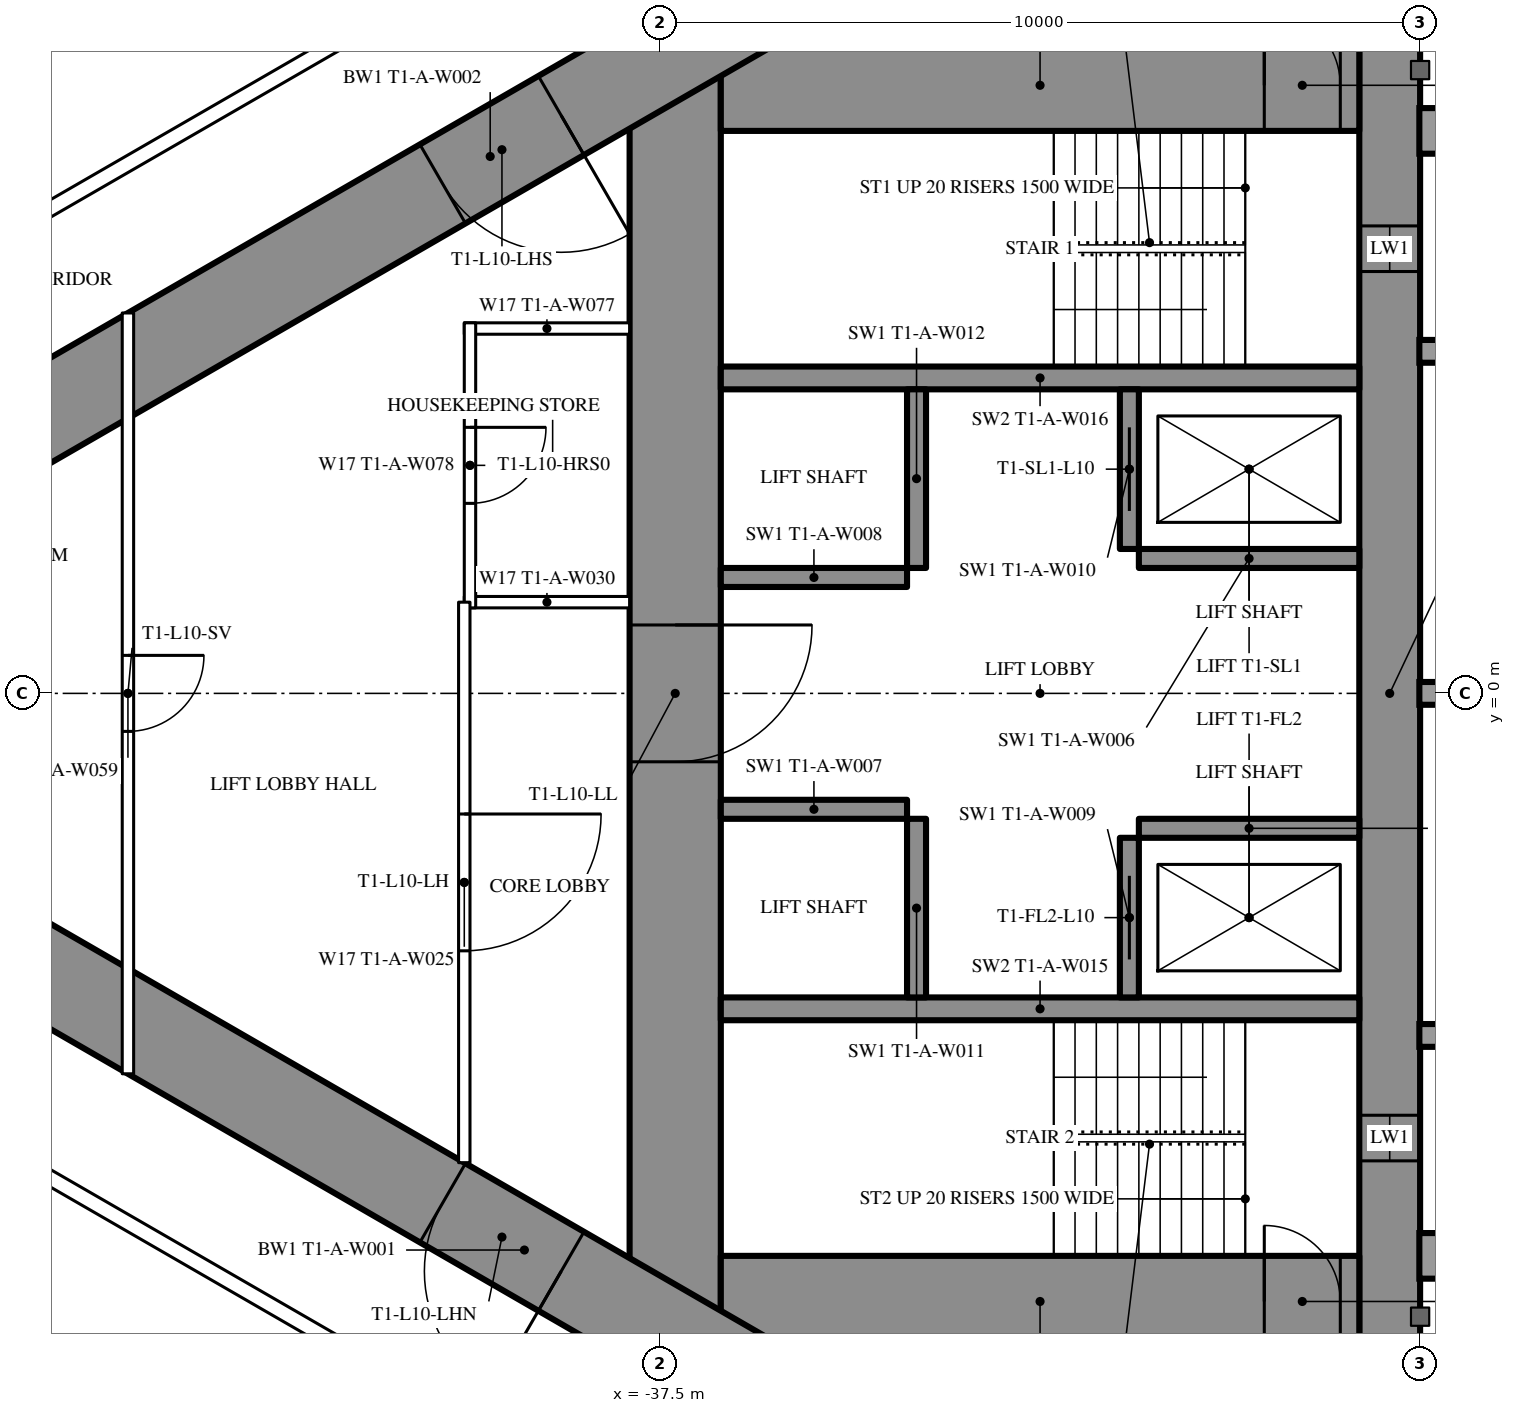
"""IFC4 building model, lengths in metres.
Left out: names, types, materials, properties, quantities, classifications, styles, units other than length and angle.
Written with IfcOpenShell. Run it as: python <this file> out.ifc"""

import sys

from ifc_helpers import new_model, si_unit, direction, frame, frame_2d, origin, place, context, subcontext, project, spatial, rectangle, extrude, element, fill, save


model = new_model("IFC4")
c1 = context("Model", 3, precision=1e-05, world=origin(), true_north=direction((0.0, 1.0)))
c2 = subcontext(c1, "Body", "Model", "MODEL_VIEW")
j1 = project(units=[si_unit("LENGTHUNIT", "METRE"), si_unit("PLANEANGLEUNIT", "RADIAN")], contexts=[c1])
p1 = place(None, origin())
s1 = spatial("IfcSite", under=j1, at=p1, CompositionType="ELEMENT")
p2 = place(p1, origin())
s2 = spatial("IfcBuilding", under=s1, at=p2, CompositionType="ELEMENT")
p3 = place(p2, frame((0.0, 0.0, 42.5)))
s3 = spatial("IfcBuildingStorey", under=s2, at=p3, CompositionType="ELEMENT", Elevation=42.5)
p4 = place(p3, frame((-27.9, 8.6, 0.0), z_axis=(0.0, 0.0, 1.0), x_axis=(0.0, -1.0, 0.0)))
e1 = element("IfcWall", 1, at=p4, inside=s3, PredefinedType="SHEAR", context=c2, shape_type="SweptSolid", body=[
    extrude(rectangle(XDim=17.2, YDim=0.8, at=frame_2d((8.6, 0.0))), origin(), (0.0, 0.0, 1.0), 3.5),
])
p5 = place(p4, frame((2.45, 0.0, 0.6)))
e2 = element("IfcOpeningElement", 2, at=p5, cuts=e1, PredefinedType="OPENING", context=c2, shape_type="SweptSolid", body=[
    extrude(rectangle(XDim=0.6, YDim=2.1, at=frame_2d((0.3, 1.05))), frame((0.0, 0.41, 0.0), z_axis=(0.0, -1.0, 0.0), x_axis=(1.0, 0.0, 0.0)), (0.0, 0.0, 1.0), 0.82),
])
p6 = place(p4, frame((14.15, 0.0, 0.6)))
e3 = element("IfcOpeningElement", 3, at=p6, cuts=e1, PredefinedType="OPENING", context=c2, shape_type="SweptSolid", body=[
    extrude(rectangle(XDim=0.6, YDim=2.1, at=frame_2d((0.3, 1.05))), frame((0.0, 0.41, 0.0), z_axis=(0.0, -1.0, 0.0), x_axis=(1.0, 0.0, 0.0)), (0.0, 0.0, 1.0), 0.82),
])
p7 = place(p3, frame((-37.3, 8.6, 0.0), z_axis=(0.0, 0.0, 1.0), x_axis=(0.0, -1.0, 0.0)))
e4 = element("IfcWall", 4, at=p7, inside=s3, PredefinedType="SHEAR", context=c2, shape_type="SweptSolid", body=[
    extrude(rectangle(XDim=17.2, YDim=1.2, at=frame_2d((8.6, 0.0))), origin(), (0.0, 0.0, 1.0), 3.5),
])
p8 = place(p7, frame((7.7, 0.0, 0.0)))
e5 = element("IfcOpeningElement", 5, at=p8, cuts=e4, PredefinedType="OPENING", context=c2, shape_type="SweptSolid", body=[
    extrude(rectangle(XDim=1.8, YDim=2.2, at=frame_2d((0.9, 1.1))), frame((0.0, 0.61, 0.0), z_axis=(0.0, -1.0, 0.0), x_axis=(1.0, 0.0, 0.0)), (0.0, 0.0, 1.0), 1.22),
])
p9 = place(p3, frame((-28.3, 8.0, 0.0), z_axis=(0.0, 0.0, 1.0), x_axis=(-1.0, 0.0, 0.0)))
e6 = element("IfcWall", 6, at=p9, inside=s3, PredefinedType="SHEAR", context=c2, shape_type="SweptSolid", body=[
    extrude(rectangle(XDim=8.4, YDim=1.2, at=frame_2d((4.2, 0.0))), origin(), (0.0, 0.0, 1.0), 3.5),
])
p10 = place(p9, frame((0.25, 0.0, 0.0)))
e7 = element("IfcOpeningElement", 7, at=p10, cuts=e6, PredefinedType="OPENING", context=c2, shape_type="SweptSolid", body=[
    extrude(rectangle(XDim=1.0, YDim=2.2, at=frame_2d((0.5, 1.1))), frame((0.0, 0.61, 0.0), z_axis=(0.0, -1.0, 0.0), x_axis=(1.0, 0.0, 0.0)), (0.0, 0.0, 1.0), 1.22),
])
p11 = place(p3, frame((-28.3, -8.0, 0.0), z_axis=(0.0, 0.0, 1.0), x_axis=(-1.0, 0.0, 0.0)))
e8 = element("IfcWall", 8, at=p11, inside=s3, PredefinedType="SHEAR", context=c2, shape_type="SweptSolid", body=[
    extrude(rectangle(XDim=8.4, YDim=1.2, at=frame_2d((4.2, 0.0))), origin(), (0.0, 0.0, 1.0), 3.5),
])
p12 = place(p11, frame((0.25, 0.0, 0.0)))
e9 = element("IfcOpeningElement", 9, at=p12, cuts=e8, PredefinedType="OPENING", context=c2, shape_type="SweptSolid", body=[
    extrude(rectangle(XDim=1.0, YDim=2.2, at=frame_2d((0.5, 1.1))), frame((0.0, 0.61, 0.0), z_axis=(0.0, -1.0, 0.0), x_axis=(1.0, 0.0, 0.0)), (0.0, 0.0, 1.0), 1.22),
])
for number, where, z_axis, x_axis in (
    (10, (-28.3, 4.15, 0.0), (0.0, 0.0, 1.0), (-1.0, 0.0, 0.0)),
    (11, (-28.3, -4.15, 0.0), (0.0, 0.0, 1.0), (-1.0, 0.0, 0.0)),
):
    element("IfcWall", number, at=place(p3, frame(where, z_axis=z_axis, x_axis=x_axis)), inside=s3, PredefinedType="SHEAR", context=c2, shape_type="SweptSolid", body=[
        extrude(rectangle(XDim=8.4, YDim=0.3, at=frame_2d((4.2, 0.0))), origin(), (0.0, 0.0, 1.0), 3.5),
    ])
p13 = place(p3, frame((-31.325, 4.0, 0.0), z_axis=(0.0, 0.0, 1.0), x_axis=(0.0, -1.0, 0.0)))
e12 = element("IfcWall", 12, at=p13, inside=s3, PredefinedType="SHEAR", context=c2, shape_type="SweptSolid", body=[
    extrude(rectangle(XDim=2.1, YDim=0.25, at=frame_2d((1.05, 0.0))), origin(), (0.0, 0.0, 1.0), 3.5),
])
p14 = place(p13, frame((0.5, 0.0, 0.0)))
e13 = element("IfcOpeningElement", 13, at=p14, cuts=e12, PredefinedType="OPENING", context=c2, shape_type="SweptSolid", body=[
    extrude(rectangle(XDim=1.1, YDim=2.2, at=frame_2d((0.55, 1.1))), frame((0.0, 0.135, 0.0), z_axis=(0.0, -1.0, 0.0), x_axis=(1.0, 0.0, 0.0)), (0.0, 0.0, 1.0), 0.27),
])
p15 = place(p3, frame((-34.125, 4.0, 0.0), z_axis=(0.0, 0.0, 1.0), x_axis=(0.0, -1.0, 0.0)))
e14 = element("IfcWall", 14, at=p15, inside=s3, PredefinedType="SHEAR", context=c2, shape_type="SweptSolid", body=[
    extrude(rectangle(XDim=2.35, YDim=0.25, at=frame_2d((1.175, 0.0))), origin(), (0.0, 0.0, 1.0), 3.5),
])
p16 = place(p3, frame((-28.3, 1.775, 0.0), z_axis=(0.0, 0.0, 1.0), x_axis=(-1.0, 0.0, 0.0)))
e15 = element("IfcWall", 15, at=p16, inside=s3, PredefinedType="SHEAR", context=c2, shape_type="SweptSolid", body=[
    extrude(rectangle(XDim=2.9, YDim=0.25, at=frame_2d((1.45, 0.0))), origin(), (0.0, 0.0, 1.0), 3.5),
])
p17 = place(p3, frame((-34.25, 1.525, 0.0), z_axis=(0.0, 0.0, 1.0), x_axis=(-1.0, 0.0, 0.0)))
e16 = element("IfcWall", 16, at=p17, inside=s3, PredefinedType="SHEAR", context=c2, shape_type="SweptSolid", body=[
    extrude(rectangle(XDim=2.45, YDim=0.25, at=frame_2d((1.225, 0.0))), origin(), (0.0, 0.0, 1.0), 3.5),
])
p18 = place(p3, frame((-31.325, -1.9, 0.0), z_axis=(0.0, 0.0, 1.0), x_axis=(0.0, -1.0, 0.0)))
e17 = element("IfcWall", 17, at=p18, inside=s3, PredefinedType="SHEAR", context=c2, shape_type="SweptSolid", body=[
    extrude(rectangle(XDim=2.1, YDim=0.25, at=frame_2d((1.05, 0.0))), origin(), (0.0, 0.0, 1.0), 3.5),
])
p19 = place(p18, frame((0.5, 0.0, 0.0)))
e18 = element("IfcOpeningElement", 18, at=p19, cuts=e17, PredefinedType="OPENING", context=c2, shape_type="SweptSolid", body=[
    extrude(rectangle(XDim=1.1, YDim=2.2, at=frame_2d((0.55, 1.1))), frame((0.0, 0.135, 0.0), z_axis=(0.0, -1.0, 0.0), x_axis=(1.0, 0.0, 0.0)), (0.0, 0.0, 1.0), 0.27),
])
p20 = place(p3, frame((-34.125, -1.65, 0.0), z_axis=(0.0, 0.0, 1.0), x_axis=(0.0, -1.0, 0.0)))
e19 = element("IfcWall", 19, at=p20, inside=s3, PredefinedType="SHEAR", context=c2, shape_type="SweptSolid", body=[
    extrude(rectangle(XDim=2.35, YDim=0.25, at=frame_2d((1.175, 0.0))), origin(), (0.0, 0.0, 1.0), 3.5),
])
p21 = place(p3, frame((-28.3, -1.775, 0.0), z_axis=(0.0, 0.0, 1.0), x_axis=(-1.0, 0.0, 0.0)))
e20 = element("IfcWall", 20, at=p21, inside=s3, PredefinedType="SHEAR", context=c2, shape_type="SweptSolid", body=[
    extrude(rectangle(XDim=2.9, YDim=0.25, at=frame_2d((1.45, 0.0))), origin(), (0.0, 0.0, 1.0), 3.5),
])
p22 = place(p3, frame((-34.25, -1.525, 0.0), z_axis=(0.0, 0.0, 1.0), x_axis=(-1.0, 0.0, 0.0)))
e21 = element("IfcWall", 21, at=p22, inside=s3, PredefinedType="SHEAR", context=c2, shape_type="SweptSolid", body=[
    extrude(rectangle(XDim=2.45, YDim=0.25, at=frame_2d((1.225, 0.0))), origin(), (0.0, 0.0, 1.0), 3.5),
])
p23 = place(p3, frame((-27.2, 14.3, 0.0), z_axis=(0.0, 0.0, 1.0), x_axis=(-0.866026593062, -0.499997940104, 0.0)))
e22 = element("IfcWall", 22, at=p23, inside=s3, PredefinedType="SHEAR", context=c2, shape_type="SweptSolid", body=[
    extrude(rectangle(XDim=28.946, YDim=1.2, at=frame_2d((14.473, 0.0))), origin(), (0.0, 0.0, 1.0), 3.5),
])
p24 = place(p23, frame((4.6, 0.0, 0.0)))
e23 = element("IfcOpeningElement", 23, at=p24, cuts=e22, PredefinedType="OPENING", context=c2, shape_type="SweptSolid", body=[
    extrude(rectangle(XDim=1.0, YDim=2.2, at=frame_2d((0.5, 1.1))), frame((0.0, 0.61, 0.0), z_axis=(0.0, -1.0, 0.0), x_axis=(1.0, 0.0, 0.0)), (0.0, 0.0, 1.0), 1.22),
])
p25 = place(p23, frame((13.395, 0.0, 0.0)))
e24 = element("IfcOpeningElement", 24, at=p25, cuts=e22, PredefinedType="OPENING", context=c2, shape_type="SweptSolid", body=[
    extrude(rectangle(XDim=1.8, YDim=2.2, at=frame_2d((0.9, 1.1))), frame((0.0, 0.61, 0.0), z_axis=(0.0, -1.0, 0.0), x_axis=(1.0, 0.0, 0.0)), (0.0, 0.0, 1.0), 1.22),
])
p26 = place(p3, frame((-27.2, -14.3, 0.0), z_axis=(0.0, 0.0, 1.0), x_axis=(-0.866024021859, 0.500002393557, 0.0)))
e25 = element("IfcWall", 25, at=p26, inside=s3, PredefinedType="SHEAR", context=c2, shape_type="SweptSolid", body=[
    extrude(rectangle(XDim=27.907, YDim=1.2, at=frame_2d((13.954, 0.0))), origin(), (0.0, 0.0, 1.0), 3.5),
])
p27 = place(p26, frame((4.6, 0.0, 0.0)))
e26 = element("IfcOpeningElement", 26, at=p27, cuts=e25, PredefinedType="OPENING", context=c2, shape_type="SweptSolid", body=[
    extrude(rectangle(XDim=1.0, YDim=2.2, at=frame_2d((0.5, 1.1))), frame((0.0, 0.61, 0.0), z_axis=(0.0, -1.0, 0.0), x_axis=(1.0, 0.0, 0.0)), (0.0, 0.0, 1.0), 1.22),
])
p28 = place(p26, frame((13.395, 0.0, 0.0)))
e27 = element("IfcOpeningElement", 27, at=p28, cuts=e25, PredefinedType="OPENING", context=c2, shape_type="SweptSolid", body=[
    extrude(rectangle(XDim=1.8, YDim=2.2, at=frame_2d((0.9, 1.1))), frame((0.0, 0.61, 0.0), z_axis=(0.0, -1.0, 0.0), x_axis=(1.0, 0.0, 0.0)), (0.0, 0.0, 1.0), 1.22),
])
p29 = place(p3, frame((-37.7, 10.894, 0.0), z_axis=(0.0, 0.0, 1.0), x_axis=(-0.866027905338, -0.499995667157, 0.0)))
e28 = element("IfcWall", 28, at=p29, inside=s3, PredefinedType="PARTITIONING", context=c2, shape_type="SweptSolid", body=[
    extrude(rectangle(XDim=21.787, YDim=0.2, at=frame_2d((10.894, 0.0))), origin(), (0.0, 0.0, 1.0), 3.25),
])
p30 = place(p29, frame((11.78, 0.0, 0.0)))
e29 = element("IfcOpeningElement", 29, at=p30, cuts=e28, PredefinedType="OPENING", context=c2, shape_type="SweptSolid", body=[
    extrude(rectangle(XDim=0.95, YDim=2.2, at=frame_2d((0.475, 1.1))), frame((0.0, 0.11, 0.0), z_axis=(0.0, -1.0, 0.0), x_axis=(1.0, 0.0, 0.0)), (0.0, 0.0, 1.0), 0.22),
])
p31 = place(p29, frame((2.95, 0.0, 0.0)))
e30 = element("IfcOpeningElement", 30, at=p31, cuts=e28, PredefinedType="OPENING", context=c2, shape_type="SweptSolid", body=[
    extrude(rectangle(XDim=0.95, YDim=2.2, at=frame_2d((0.475, 1.1))), frame((0.0, 0.11, 0.0), z_axis=(0.0, -1.0, 0.0), x_axis=(1.0, 0.0, 0.0)), (0.0, 0.0, 1.0), 0.22),
])
p32 = place(p3, frame((-36.92, -11.344, 0.0), z_axis=(0.0, 0.0, 1.0), x_axis=(-0.866028313256, 0.499994960614, 0.0)))
e31 = element("IfcWall", 31, at=p32, inside=s3, PredefinedType="PARTITIONING", context=c2, shape_type="SweptSolid", body=[
    extrude(rectangle(XDim=22.568, YDim=0.2, at=frame_2d((11.284, 0.0))), origin(), (0.0, 0.0, 1.0), 3.25),
])
p33 = place(p32, frame((21.018, 0.0, 0.0)))
e32 = element("IfcOpeningElement", 32, at=p33, cuts=e31, PredefinedType="OPENING", context=c2, shape_type="SweptSolid", body=[
    extrude(rectangle(XDim=0.95, YDim=2.2, at=frame_2d((0.475, 1.1))), frame((0.0, 0.11, 0.0), z_axis=(0.0, -1.0, 0.0), x_axis=(1.0, 0.0, 0.0)), (0.0, 0.0, 1.0), 0.22),
])
p34 = place(p32, frame((3.35, 0.0, 0.0)))
e33 = element("IfcOpeningElement", 33, at=p34, cuts=e31, PredefinedType="OPENING", context=c2, shape_type="SweptSolid", body=[
    extrude(rectangle(XDim=1.0, YDim=2.2, at=frame_2d((0.5, 1.1))), frame((0.0, 0.11, 0.0), z_axis=(0.0, -1.0, 0.0), x_axis=(1.0, 0.0, 0.0)), (0.0, 0.0, 1.0), 0.22),
])
for number, where, z_axis, x_axis in (
    (34, (-37.9, 1.2, 0.0), (0.0, 0.0, 1.0), (-1.0, 0.0, 0.0)),
    (35, (-37.9, 4.8, 0.0), (0.0, 0.0, 1.0), (-1.0, 0.0, 0.0)),
):
    element("IfcWall", number, at=place(p3, frame(where, z_axis=z_axis, x_axis=x_axis)), inside=s3, PredefinedType="PARTITIONING", context=c2, shape_type="SweptSolid", body=[
        extrude(rectangle(XDim=2.175, YDim=0.15, at=frame_2d((1.087, 0.0))), origin(), (0.0, 0.0, 1.0), 3.25),
    ])
p35 = place(p3, frame((-40.0, 4.875, 0.0), z_axis=(0.0, 0.0, 1.0), x_axis=(0.0, -1.0, 0.0)))
e36 = element("IfcWall", 36, at=p35, inside=s3, PredefinedType="PARTITIONING", context=c2, shape_type="SweptSolid", body=[
    extrude(rectangle(XDim=3.75, YDim=0.15, at=frame_2d((1.875, 0.0))), origin(), (0.0, 0.0, 1.0), 3.25),
])
p36 = place(p35, frame((1.375, 0.0, 0.0)))
e37 = element("IfcOpeningElement", 37, at=p36, cuts=e36, PredefinedType="OPENING", context=c2, shape_type="SweptSolid", body=[
    extrude(rectangle(XDim=1.0, YDim=2.2, at=frame_2d((0.5, 1.1))), frame((0.0, 0.085, 0.0), z_axis=(0.0, -1.0, 0.0), x_axis=(1.0, 0.0, 0.0)), (0.0, 0.0, 1.0), 0.17),
])
p37 = place(p3, frame((-40.075, 1.2, 0.0), z_axis=(0.0, 0.0, 1.0), x_axis=(0.0, -1.0, 0.0)))
e38 = element("IfcWall", 38, at=p37, inside=s3, PredefinedType="PARTITIONING", context=c2, shape_type="SweptSolid", body=[
    extrude(rectangle(XDim=7.374, YDim=0.15, at=frame_2d((3.687, 0.0))), origin(), (0.0, 0.0, 1.0), 3.25),
])
p38 = place(p37, frame((2.787, 0.0, 0.0)))
e39 = element("IfcOpeningElement", 39, at=p38, cuts=e38, PredefinedType="OPENING", context=c2, shape_type="SweptSolid", body=[
    extrude(rectangle(XDim=1.8, YDim=2.2, at=frame_2d((0.9, 1.1))), frame((0.0, 0.085, 0.0), z_axis=(0.0, -1.0, 0.0), x_axis=(1.0, 0.0, 0.0)), (0.0, 0.0, 1.0), 0.17),
])
p39 = place(p3, frame((-44.5, 5.005, 0.0), z_axis=(0.0, 0.0, 1.0), x_axis=(0.0, -1.0, 0.0)))
e40 = element("IfcWall", 40, at=p39, inside=s3, PredefinedType="PARTITIONING", context=c2, shape_type="SweptSolid", body=[
    extrude(rectangle(XDim=10.009, YDim=0.15, at=frame_2d((5.005, 0.0))), origin(), (0.0, 0.0, 1.0), 2.45),
])
p40 = place(p39, frame((4.505, 0.0, 0.0)))
e41 = element("IfcOpeningElement", 41, at=p40, cuts=e40, PredefinedType="OPENING", context=c2, shape_type="SweptSolid", body=[
    extrude(rectangle(XDim=1.0, YDim=2.2, at=frame_2d((0.5, 1.1))), frame((0.0, 0.085, 0.0), z_axis=(0.0, -1.0, 0.0), x_axis=(1.0, 0.0, 0.0)), (0.0, 0.0, 1.0), 0.17),
])
p41 = place(p36, origin())
e42 = element("IfcDoor", 42, at=p41, inside=s3, OperationType="SINGLE_SWING_LEFT", PredefinedType="DOOR", context=c2, shape_type="SweptSolid", body=[
    extrude(rectangle(XDim=1.0, YDim=2.2, at=frame_2d((0.5, 1.1))), frame((0.0, 0.025, 0.0), z_axis=(0.0, -1.0, 0.0), x_axis=(1.0, 0.0, 0.0)), (0.0, 0.0, 1.0), 0.05),
])
fill(e37, e42)
p42 = place(p38, origin())
e43 = element("IfcDoor", 43, at=p42, inside=s3, OperationType="DOUBLE_DOOR_SINGLE_SWING", PredefinedType="DOOR", context=c2, shape_type="SweptSolid", body=[
    extrude(rectangle(XDim=1.8, YDim=2.2, at=frame_2d((0.9, 1.1))), frame((0.0, 0.025, 0.0), z_axis=(0.0, -1.0, 0.0), x_axis=(1.0, 0.0, 0.0)), (0.0, 0.0, 1.0), 0.05),
])
fill(e39, e43)
p43 = place(p40, origin())
e44 = element("IfcDoor", 44, at=p43, inside=s3, OperationType="SINGLE_SWING_LEFT", PredefinedType="DOOR", context=c2, shape_type="SweptSolid", body=[
    extrude(rectangle(XDim=1.0, YDim=2.2, at=frame_2d((0.5, 1.1))), frame((0.0, 0.025, 0.0), z_axis=(0.0, -1.0, 0.0), x_axis=(1.0, 0.0, 0.0)), (0.0, 0.0, 1.0), 0.05),
])
fill(e41, e44)
p44 = place(p25, origin())
e45 = element("IfcDoor", 45, at=p44, inside=s3, OperationType="DOUBLE_DOOR_SINGLE_SWING", PredefinedType="DOOR", context=c2, shape_type="SweptSolid", body=[
    extrude(rectangle(XDim=1.8, YDim=2.2, at=frame_2d((0.9, 1.1))), frame((0.0, 0.025, 0.0), z_axis=(0.0, -1.0, 0.0), x_axis=(1.0, 0.0, 0.0)), (0.0, 0.0, 1.0), 0.05),
])
fill(e24, e45)
p45 = place(p28, origin())
e46 = element("IfcDoor", 46, at=p45, inside=s3, OperationType="DOUBLE_DOOR_SINGLE_SWING", PredefinedType="DOOR", context=c2, shape_type="SweptSolid", body=[
    extrude(rectangle(XDim=1.8, YDim=2.2, at=frame_2d((0.9, 1.1))), frame((0.0, 0.025, 0.0), z_axis=(0.0, -1.0, 0.0), x_axis=(1.0, 0.0, 0.0)), (0.0, 0.0, 1.0), 0.05),
])
fill(e27, e46)
p46 = place(p8, origin())
e47 = element("IfcDoor", 47, at=p46, inside=s3, OperationType="DOUBLE_DOOR_SINGLE_SWING", PredefinedType="DOOR", context=c2, shape_type="SweptSolid", body=[
    extrude(rectangle(XDim=1.8, YDim=2.2, at=frame_2d((0.9, 1.1))), frame((0.0, 0.025, 0.0), z_axis=(0.0, -1.0, 0.0), x_axis=(1.0, 0.0, 0.0)), (0.0, 0.0, 1.0), 0.05),
])
fill(e5, e47)
p47 = place(p10, origin())
e48 = element("IfcDoor", 48, at=p47, inside=s3, OperationType="SINGLE_SWING_RIGHT", PredefinedType="DOOR", context=c2, shape_type="SweptSolid", body=[
    extrude(rectangle(XDim=1.0, YDim=2.2, at=frame_2d((0.5, 1.1))), frame((0.0, 0.025, 0.0), z_axis=(0.0, -1.0, 0.0), x_axis=(1.0, 0.0, 0.0)), (0.0, 0.0, 1.0), 0.05),
])
fill(e7, e48)
p48 = place(p12, origin())
e49 = element("IfcDoor", 49, at=p48, inside=s3, OperationType="SINGLE_SWING_RIGHT", PredefinedType="DOOR", context=c2, shape_type="SweptSolid", body=[
    extrude(rectangle(XDim=1.0, YDim=2.2, at=frame_2d((0.5, 1.1))), frame((0.0, 0.025, 0.0), z_axis=(0.0, -1.0, 0.0), x_axis=(1.0, 0.0, 0.0)), (0.0, 0.0, 1.0), 0.05),
])
fill(e9, e49)
p49 = place(p14, origin())
e50 = element("IfcDoor", 50, at=p49, inside=s3, OperationType="SLIDING_TO_LEFT", PredefinedType="USERDEFINED", context=c2, shape_type="SweptSolid", body=[
    extrude(rectangle(XDim=1.1, YDim=2.2, at=frame_2d((0.55, 1.1))), frame((0.0, 0.025, 0.0), z_axis=(0.0, -1.0, 0.0), x_axis=(1.0, 0.0, 0.0)), (0.0, 0.0, 1.0), 0.05),
])
fill(e13, e50)
p50 = place(p19, origin())
e51 = element("IfcDoor", 51, at=p50, inside=s3, OperationType="SLIDING_TO_LEFT", PredefinedType="USERDEFINED", context=c2, shape_type="SweptSolid", body=[
    extrude(rectangle(XDim=1.1, YDim=2.2, at=frame_2d((0.55, 1.1))), frame((0.0, 0.025, 0.0), z_axis=(0.0, -1.0, 0.0), x_axis=(1.0, 0.0, 0.0)), (0.0, 0.0, 1.0), 0.05),
])
fill(e18, e51)
p51 = place(p5, origin())
e52 = element("IfcWindow", 52, at=p51, inside=s3, PartitioningType="SINGLE_PANEL", PredefinedType="WINDOW", context=c2, shape_type="SweptSolid", body=[
    extrude(rectangle(XDim=0.6, YDim=2.1, at=frame_2d((0.3, 1.05))), frame((0.0, 0.03, 0.0), z_axis=(0.0, -1.0, 0.0), x_axis=(1.0, 0.0, 0.0)), (0.0, 0.0, 1.0), 0.06),
])
fill(e2, e52)
p52 = place(p6, origin())
e53 = element("IfcWindow", 53, at=p52, inside=s3, PartitioningType="SINGLE_PANEL", PredefinedType="WINDOW", context=c2, shape_type="SweptSolid", body=[
    extrude(rectangle(XDim=0.6, YDim=2.1, at=frame_2d((0.3, 1.05))), frame((0.0, 0.03, 0.0), z_axis=(0.0, -1.0, 0.0), x_axis=(1.0, 0.0, 0.0)), (0.0, 0.0, 1.0), 0.06),
])
fill(e3, e53)
save(model, sys.argv[1])
